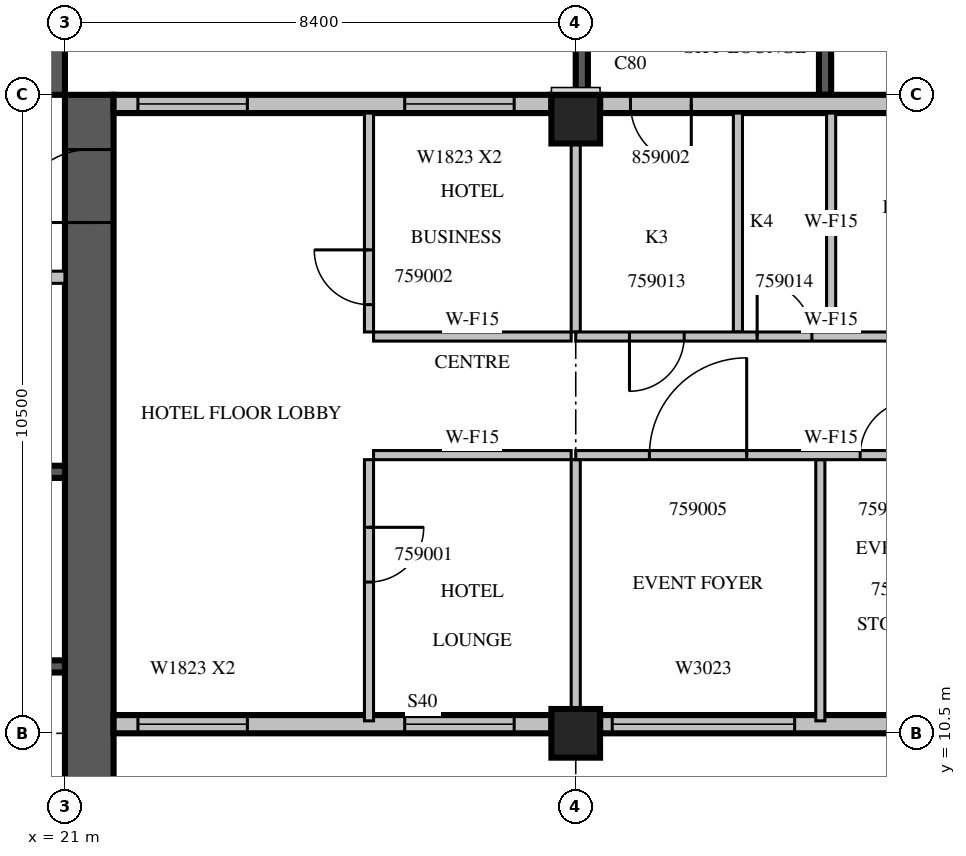
"""IFC4 building model, lengths in metres.
Left out: names, types, materials, properties, quantities, classifications, styles, units other than length and angle.
Written with IfcOpenShell. Run it as: python <this file> out.ifc"""

import sys

from ifc_helpers import new_model, si_unit, direction, frame, frame_2d, origin, origin_2d, place, context, subcontext, project, spatial, rectangle, extrude, source, transform, mapped, element, fill, save


model = new_model("IFC4")
c1 = context("Model", 3, precision=1e-05, world=origin(), true_north=direction((0.0, 1.0)))
c2 = subcontext(c1, "Body", "Model", "MODEL_VIEW")
j1 = project(units=[si_unit("LENGTHUNIT", "METRE"), si_unit("PLANEANGLEUNIT", "RADIAN")], contexts=[c1])
p1 = place(None, origin())
s1 = spatial("IfcSite", under=j1, at=p1, CompositionType="ELEMENT")
p2 = place(p1, origin())
s2 = spatial("IfcBuilding", under=s1, at=p2, CompositionType="ELEMENT")
p3 = place(p2, frame((0.0, 0.0, 257.6)))
s3 = spatial("IfcBuildingStorey", under=s2, at=p3, CompositionType="ELEMENT", Elevation=257.6)
m1 = source(origin(), c2, "Body", "SweptSolid", [
    extrude(rectangle(XDim=0.8, YDim=0.8, at=origin_2d()), origin(), (0.0, 0.0, 1.0), 3.8),
])
for number, where, z_axis, x_axis in (
    (1, (29.4, 10.5, 0.0), (0.0, 0.0, 1.0), (1.0, 0.0, 0.0)),
    (2, (29.4, 20.6, 0.0), (0.0, 0.0, 1.0), (1.0, 0.0, 0.0)),
):
    element("IfcColumn", number, at=place(p3, frame(where, z_axis=z_axis, x_axis=x_axis)), inside=s3, PredefinedType="COLUMN", context=c2, shape_type="MappedRepresentation", body=[
        mapped(m1, transform((0.0, 0.0, 0.0), scale=1.0)),
    ])
m2 = source(origin(), c2, "Body", "SweptSolid", [
    extrude(rectangle(XDim=16.8, YDim=0.8, at=frame_2d((8.4, 0.0))), origin(), (0.0, 0.0, 1.0), 3.8),
])
p4 = place(p3, frame((21.4, 4.2, 0.0), z_axis=(0.0, 0.0, 1.0), x_axis=(0.0, 1.0, 0.0)))
e3 = element("IfcWall", 3, at=p4, inside=s3, PredefinedType="SHEAR", context=c2, shape_type="MappedRepresentation", body=[
    mapped(m2, transform((0.0, 0.0, 0.0), scale=1.0)),
])
m3 = source(origin(), c2, "Body", "SweptSolid", [
    extrude(rectangle(XDim=1.2, YDim=2.1, at=frame_2d((0.6, 1.05))), frame((0.0, 0.41, 0.0), z_axis=(0.0, -1.0, 0.0), x_axis=(1.0, 0.0, 0.0)), (0.0, 0.0, 1.0), 0.82),
])
p5 = place(p4, frame((14.7, 0.0, 0.0)))
e4 = element("IfcOpeningElement", 4, at=p5, cuts=e3, PredefinedType="OPENING", context=c2, shape_type="MappedRepresentation", body=[
    mapped(m3, transform((0.0, 0.0, 0.0), scale=1.0)),
])
p6 = place(p3, frame((4.2, 21.4, 0.0), z_axis=(0.0, 0.0, 1.0), x_axis=(1.0, 0.0, 0.0)))
e5 = element("IfcWall", 5, at=p6, inside=s3, PredefinedType="SHEAR", context=c2, shape_type="MappedRepresentation", body=[
    mapped(m2, transform((0.0, 0.0, 0.0), scale=1.0)),
])
p7 = place(p6, frame((6.2, 0.0, 0.0)))
e6 = element("IfcOpeningElement", 6, at=p7, cuts=e5, PredefinedType="OPENING", context=c2, shape_type="MappedRepresentation", body=[
    mapped(m3, transform((0.0, 0.0, 0.0), scale=1.0)),
])
m4 = source(origin(), c2, "Body", "SweptSolid", [
    extrude(rectangle(XDim=3.9, YDim=0.2, at=frame_2d((1.95, 0.0))), origin(), (0.0, 0.0, 1.0), 3.4),
])
p8 = place(p3, frame((33.5, 21.0, 0.0), z_axis=(0.0, 0.0, 1.0), x_axis=(0.0, 1.0, 0.0)))
e7 = element("IfcWall", 7, at=p8, inside=s3, PredefinedType="SOLIDWALL", context=c2, shape_type="MappedRepresentation", body=[
    mapped(m4, transform((0.0, 0.0, 0.0), scale=1.0)),
])
m5 = source(origin(), c2, "Body", "SweptSolid", [
    extrude(rectangle(XDim=2.4, YDim=2.3, at=frame_2d((1.2, 1.15))), frame((0.0, 0.11, 0.0), z_axis=(0.0, -1.0, 0.0), x_axis=(1.0, 0.0, 0.0)), (0.0, 0.0, 1.0), 0.22),
])
p9 = place(p8, frame((0.75, 0.0, 0.6)))
e8 = element("IfcOpeningElement", 8, at=p9, cuts=e7, PredefinedType="OPENING", context=c2, shape_type="MappedRepresentation", body=[
    mapped(m5, transform((0.0, 0.0, 0.0), scale=1.0)),
])
p10 = place(p3, frame((29.5, 21.0, 0.0), z_axis=(0.0, 0.0, 1.0), x_axis=(0.0, 1.0, 0.0)))
e9 = element("IfcWall", 9, at=p10, inside=s3, PredefinedType="SOLIDWALL", context=c2, shape_type="MappedRepresentation", body=[
    mapped(m4, transform((0.0, 0.0, 0.0), scale=1.0)),
])
p11 = place(p10, frame((0.75, 0.0, 0.6)))
e10 = element("IfcOpeningElement", 10, at=p11, cuts=e9, PredefinedType="OPENING", context=c2, shape_type="MappedRepresentation", body=[
    mapped(m5, transform((0.0, 0.0, 0.0), scale=1.0)),
])
m6 = source(origin(), c2, "Body", "SweptSolid", [
    extrude(rectangle(XDim=7.2, YDim=0.3, at=frame_2d((3.6, 0.0))), origin(), (0.0, 0.0, 1.0), 3.4),
])
p12 = place(p3, frame((21.8, 10.65, 0.0), z_axis=(0.0, 0.0, 1.0), x_axis=(1.0, 0.0, 0.0)))
e11 = element("IfcWall", 11, at=p12, inside=s3, PredefinedType="STANDARD", context=c2, shape_type="MappedRepresentation", body=[
    mapped(m6, transform((0.0, 0.0, 0.0), scale=1.0)),
])
m7 = source(origin(), c2, "Body", "SweptSolid", [
    extrude(rectangle(XDim=1.8, YDim=2.3, at=frame_2d((0.9, 1.15))), frame((0.0, 0.16, 0.0), z_axis=(0.0, -1.0, 0.0), x_axis=(1.0, 0.0, 0.0)), (0.0, 0.0, 1.0), 0.32),
])
p13 = place(p12, frame((0.4, 0.0, 0.6)))
e12 = element("IfcOpeningElement", 12, at=p13, cuts=e11, PredefinedType="OPENING", context=c2, shape_type="MappedRepresentation", body=[
    mapped(m7, transform((0.0, 0.0, 0.0), scale=1.0)),
])
p14 = place(p12, frame((4.787, 0.0, 0.6)))
e13 = element("IfcOpeningElement", 13, at=p14, cuts=e11, PredefinedType="OPENING", context=c2, shape_type="MappedRepresentation", body=[
    mapped(m7, transform((0.0, 0.0, 0.0), scale=1.0)),
])
m8 = source(origin(), c2, "Body", "SweptSolid", [
    extrude(rectangle(XDim=7.6, YDim=0.3, at=frame_2d((3.8, 0.0))), origin(), (0.0, 0.0, 1.0), 3.4),
])
p15 = place(p3, frame((29.8, 10.65, 0.0), z_axis=(0.0, 0.0, 1.0), x_axis=(1.0, 0.0, 0.0)))
e14 = element("IfcWall", 14, at=p15, inside=s3, PredefinedType="STANDARD", context=c2, shape_type="MappedRepresentation", body=[
    mapped(m8, transform((0.0, 0.0, 0.0), scale=1.0)),
])
m9 = source(origin(), c2, "Body", "SweptSolid", [
    extrude(rectangle(XDim=3.0, YDim=2.3, at=frame_2d((1.5, 1.15))), frame((0.0, 0.16, 0.0), z_axis=(0.0, -1.0, 0.0), x_axis=(1.0, 0.0, 0.0)), (0.0, 0.0, 1.0), 0.32),
])
p16 = place(p15, frame((0.2, 0.0, 0.6)))
e15 = element("IfcOpeningElement", 15, at=p16, cuts=e14, PredefinedType="OPENING", context=c2, shape_type="MappedRepresentation", body=[
    mapped(m9, transform((0.0, 0.0, 0.0), scale=1.0)),
])
p17 = place(p3, frame((37.0, 20.85, 0.0), z_axis=(0.0, 0.0, 1.0), x_axis=(-1.0, 0.0, 0.0)))
e16 = element("IfcWall", 16, at=p17, inside=s3, PredefinedType="STANDARD", context=c2, shape_type="MappedRepresentation", body=[
    mapped(m6, transform((0.0, 0.0, 0.0), scale=1.0)),
])
p18 = place(p17, frame((0.4, 0.0, 0.6)))
e17 = element("IfcOpeningElement", 17, at=p18, cuts=e16, PredefinedType="OPENING", context=c2, shape_type="MappedRepresentation", body=[
    mapped(m7, transform((0.0, 0.0, 0.0), scale=1.0)),
])
m10 = source(origin(), c2, "Body", "SweptSolid", [
    extrude(rectangle(XDim=1.0, YDim=2.1, at=frame_2d((0.5, 1.05))), frame((0.0, 0.16, 0.0), z_axis=(0.0, -1.0, 0.0), x_axis=(1.0, 0.0, 0.0)), (0.0, 0.0, 1.0), 0.32),
])
p19 = place(p17, frame((5.7, 0.0, 0.0)))
e18 = element("IfcOpeningElement", 18, at=p19, cuts=e16, PredefinedType="OPENING", context=c2, shape_type="MappedRepresentation", body=[
    mapped(m10, transform((0.0, 0.0, 0.0), scale=1.0)),
])
p20 = place(p3, frame((29.0, 20.85, 0.0), z_axis=(0.0, 0.0, 1.0), x_axis=(-1.0, 0.0, 0.0)))
e19 = element("IfcWall", 19, at=p20, inside=s3, PredefinedType="STANDARD", context=c2, shape_type="MappedRepresentation", body=[
    mapped(m6, transform((0.0, 0.0, 0.0), scale=1.0)),
])
p21 = place(p20, frame((0.613, 0.0, 0.6)))
e20 = element("IfcOpeningElement", 20, at=p21, cuts=e19, PredefinedType="OPENING", context=c2, shape_type="MappedRepresentation", body=[
    mapped(m7, transform((0.0, 0.0, 0.0), scale=1.0)),
])
p22 = place(p20, frame((5.0, 0.0, 0.6)))
e21 = element("IfcOpeningElement", 21, at=p22, cuts=e19, PredefinedType="OPENING", context=c2, shape_type="MappedRepresentation", body=[
    mapped(m7, transform((0.0, 0.0, 0.0), scale=1.0)),
])
m11 = source(origin(), c2, "Body", "SweptSolid", [
    extrude(rectangle(XDim=9.6, YDim=0.2, at=frame_2d((4.8, 0.0))), origin(), (0.0, 0.0, 1.0), 3.8),
])
p23 = place(p3, frame((11.4, 11.6, 0.0), z_axis=(0.0, 0.0, 1.0), x_axis=(1.0, 0.0, 0.0)))
e22 = element("IfcWall", 22, at=p23, inside=s3, PredefinedType="SOLIDWALL", context=c2, shape_type="MappedRepresentation", body=[
    mapped(m11, transform((0.0, 0.0, 0.0), scale=1.0)),
])
p24 = place(p3, frame((11.4, 14.8, 0.0), z_axis=(0.0, 0.0, 1.0), x_axis=(1.0, 0.0, 0.0)))
e23 = element("IfcWall", 23, at=p24, inside=s3, PredefinedType="SOLIDWALL", context=c2, shape_type="MappedRepresentation", body=[
    mapped(m11, transform((0.0, 0.0, 0.0), scale=1.0)),
])
m12 = source(origin(), c2, "Body", "SweptSolid", [
    extrude(rectangle(XDim=1.1, YDim=2.1, at=frame_2d((0.55, 1.05))), frame((0.0, 0.11, 0.0), z_axis=(0.0, -1.0, 0.0), x_axis=(1.0, 0.0, 0.0)), (0.0, 0.0, 1.0), 0.22),
])
p25 = place(p24, frame((3.05, 0.0, 0.0)))
e24 = element("IfcOpeningElement", 24, at=p25, cuts=e23, PredefinedType="OPENING", context=c2, shape_type="MappedRepresentation", body=[
    mapped(m12, transform((0.0, 0.0, 0.0), scale=1.0)),
])
p26 = place(p24, frame((5.45, 0.0, 0.0)))
e25 = element("IfcOpeningElement", 25, at=p26, cuts=e23, PredefinedType="OPENING", context=c2, shape_type="MappedRepresentation", body=[
    mapped(m12, transform((0.0, 0.0, 0.0), scale=1.0)),
])
p27 = place(p24, frame((7.85, 0.0, 0.0)))
e26 = element("IfcOpeningElement", 26, at=p27, cuts=e23, PredefinedType="OPENING", context=c2, shape_type="MappedRepresentation", body=[
    mapped(m12, transform((0.0, 0.0, 0.0), scale=1.0)),
])
m13 = source(origin(), c2, "Body", "SweptSolid", [
    extrude(rectangle(XDim=11.45, YDim=0.2, at=frame_2d((5.725, 0.0))), origin(), (0.0, 0.0, 1.0), 3.4),
])
p28 = place(p3, frame((9.55, 18.0, 0.0), z_axis=(0.0, 0.0, 1.0), x_axis=(1.0, 0.0, 0.0)))
e27 = element("IfcWall", 27, at=p28, inside=s3, PredefinedType="PARTITIONING", context=c2, shape_type="MappedRepresentation", body=[
    mapped(m13, transform((0.0, 0.0, 0.0), scale=1.0)),
])
m14 = source(origin(), c2, "Body", "SweptSolid", [
    extrude(rectangle(XDim=0.9, YDim=2.1, at=frame_2d((0.45, 1.05))), frame((0.0, 0.11, 0.0), z_axis=(0.0, -1.0, 0.0), x_axis=(1.0, 0.0, 0.0)), (0.0, 0.0, 1.0), 0.22),
])
p29 = place(p28, frame((0.725, 0.0, 0.0)))
e28 = element("IfcOpeningElement", 28, at=p29, cuts=e27, PredefinedType="OPENING", context=c2, shape_type="MappedRepresentation", body=[
    mapped(m14, transform((0.0, 0.0, 0.0), scale=1.0)),
])
p30 = place(p28, frame((2.775, 0.0, 0.0)))
e29 = element("IfcOpeningElement", 29, at=p30, cuts=e27, PredefinedType="OPENING", context=c2, shape_type="MappedRepresentation", body=[
    mapped(m14, transform((0.0, 0.0, 0.0), scale=1.0)),
])
p31 = place(p28, frame((7.35, 0.0, 0.0)))
e30 = element("IfcOpeningElement", 30, at=p31, cuts=e27, PredefinedType="OPENING", context=c2, shape_type="MappedRepresentation", body=[
    mapped(m12, transform((0.0, 0.0, 0.0), scale=1.0)),
])
m15 = source(origin(), c2, "Body", "SweptSolid", [
    extrude(rectangle(XDim=4.295, YDim=0.15, at=frame_2d((2.147, 0.0))), origin(), (0.0, 0.0, 1.0), 3.4),
])
p32 = place(p3, frame((26.0, 15.0, 0.0), z_axis=(0.0, 0.0, 1.0), x_axis=(0.0, -1.0, 0.0)))
e31 = element("IfcWall", 31, at=p32, inside=s3, PredefinedType="PARTITIONING", context=c2, shape_type="MappedRepresentation", body=[
    mapped(m15, transform((0.0, 0.0, 0.0), scale=1.0)),
])
m16 = source(origin(), c2, "Body", "SweptSolid", [
    extrude(rectangle(XDim=0.9, YDim=2.1, at=frame_2d((0.45, 1.05))), frame((0.0, 0.085, 0.0), z_axis=(0.0, -1.0, 0.0), x_axis=(1.0, 0.0, 0.0)), (0.0, 0.0, 1.0), 0.17),
])
p33 = place(p32, frame((1.113, 0.0, 0.0)))
e32 = element("IfcOpeningElement", 32, at=p33, cuts=e31, PredefinedType="OPENING", context=c2, shape_type="MappedRepresentation", body=[
    mapped(m16, transform((0.0, 0.0, 0.0), scale=1.0)),
])
m17 = source(origin(), c2, "Body", "SweptSolid", [
    extrude(rectangle(XDim=3.6, YDim=0.15, at=frame_2d((1.8, 0.0))), origin(), (0.0, 0.0, 1.0), 3.4),
])
p34 = place(p3, frame((26.0, 20.7, 0.0), z_axis=(0.0, 0.0, 1.0), x_axis=(0.0, -1.0, 0.0)))
e33 = element("IfcWall", 33, at=p34, inside=s3, PredefinedType="PARTITIONING", context=c2, shape_type="MappedRepresentation", body=[
    mapped(m17, transform((0.0, 0.0, 0.0), scale=1.0)),
])
p35 = place(p34, frame((2.25, 0.0, 0.0)))
e34 = element("IfcOpeningElement", 34, at=p35, cuts=e33, PredefinedType="OPENING", context=c2, shape_type="MappedRepresentation", body=[
    mapped(m16, transform((0.0, 0.0, 0.0), scale=1.0)),
])
m18 = source(origin(), c2, "Body", "SweptSolid", [
    extrude(rectangle(XDim=3.25, YDim=0.15, at=frame_2d((1.625, 0.0))), origin(), (0.0, 0.0, 1.0), 3.4),
])
for number, where, z_axis, x_axis in (
    (35, (29.325, 15.075, 0.0), (0.0, 0.0, 1.0), (-1.0, 0.0, 0.0)),
    (36, (26.075, 17.025, 0.0), (0.0, 0.0, 1.0), (1.0, 0.0, 0.0)),
):
    element("IfcWall", number, at=place(p3, frame(where, z_axis=z_axis, x_axis=x_axis)), inside=s3, PredefinedType="PARTITIONING", context=c2, shape_type="MappedRepresentation", body=[
        mapped(m18, transform((0.0, 0.0, 0.0), scale=1.0)),
    ])
m19 = source(origin(), c2, "Body", "SweptSolid", [
    extrude(rectangle(XDim=4.101, YDim=0.15, at=frame_2d((2.05, 0.0))), origin(), (0.0, 0.0, 1.0), 3.4),
])
p36 = place(p3, frame((29.4, 10.899, 0.0), z_axis=(0.0, 0.0, 1.0), x_axis=(0.0, 1.0, 0.0)))
e37 = element("IfcWall", 37, at=p36, inside=s3, PredefinedType="PARTITIONING", context=c2, shape_type="MappedRepresentation", body=[
    mapped(m19, transform((0.0, 0.0, 0.0), scale=1.0)),
])
m20 = source(origin(), c2, "Body", "SweptSolid", [
    extrude(rectangle(XDim=3.101, YDim=0.15, at=frame_2d((1.55, 0.0))), origin(), (0.0, 0.0, 1.0), 3.4),
])
p37 = place(p3, frame((29.4, 17.1, 0.0), z_axis=(0.0, 0.0, 1.0), x_axis=(0.0, 1.0, 0.0)))
e38 = element("IfcWall", 38, at=p37, inside=s3, PredefinedType="PARTITIONING", context=c2, shape_type="MappedRepresentation", body=[
    mapped(m20, transform((0.0, 0.0, 0.0), scale=1.0)),
])
p38 = place(p3, frame((33.422, 10.705, 0.0), z_axis=(0.0, 0.0, 1.0), x_axis=(0.0, 1.0, 0.0)))
e39 = element("IfcWall", 39, at=p38, inside=s3, PredefinedType="PARTITIONING", context=c2, shape_type="MappedRepresentation", body=[
    mapped(m15, transform((0.0, 0.0, 0.0), scale=1.0)),
])
for number, where, z_axis, x_axis in (
    (40, (32.067, 20.7, 0.0), (0.0, 0.0, 1.0), (0.0, -1.0, 0.0)),
    (41, (33.6, 17.1, 0.0), (0.0, 0.0, 1.0), (0.0, 1.0, 0.0)),
):
    element("IfcWall", number, at=place(p3, frame(where, z_axis=z_axis, x_axis=x_axis)), inside=s3, PredefinedType="PARTITIONING", context=c2, shape_type="MappedRepresentation", body=[
        mapped(m17, transform((0.0, 0.0, 0.0), scale=1.0)),
    ])
m21 = source(origin(), c2, "Body", "SweptSolid", [
    extrude(rectangle(XDim=8.4, YDim=0.15, at=frame_2d((4.2, 0.0))), origin(), (0.0, 0.0, 1.0), 3.4),
])
p39 = place(p3, frame((37.8, 15.075, 0.0), z_axis=(0.0, 0.0, 1.0), x_axis=(-1.0, 0.0, 0.0)))
e42 = element("IfcWall", 42, at=p39, inside=s3, PredefinedType="PARTITIONING", context=c2, shape_type="MappedRepresentation", body=[
    mapped(m21, transform((0.0, 0.0, 0.0), scale=1.0)),
])
m22 = source(origin(), c2, "Body", "SweptSolid", [
    extrude(rectangle(XDim=1.6, YDim=2.1, at=frame_2d((0.8, 1.05))), frame((0.0, 0.085, 0.0), z_axis=(0.0, -1.0, 0.0), x_axis=(1.0, 0.0, 0.0)), (0.0, 0.0, 1.0), 0.17),
])
p40 = place(p39, frame((5.589, 0.0, 0.0)))
e43 = element("IfcOpeningElement", 43, at=p40, cuts=e42, PredefinedType="OPENING", context=c2, shape_type="MappedRepresentation", body=[
    mapped(m22, transform((0.0, 0.0, 0.0), scale=1.0)),
])
p41 = place(p39, frame((2.822, 0.0, 0.0)))
e44 = element("IfcOpeningElement", 44, at=p41, cuts=e42, PredefinedType="OPENING", context=c2, shape_type="MappedRepresentation", body=[
    mapped(m16, transform((0.0, 0.0, 0.0), scale=1.0)),
])
p42 = place(p3, frame((29.4, 17.025, 0.0), z_axis=(0.0, 0.0, 1.0), x_axis=(1.0, 0.0, 0.0)))
e45 = element("IfcWall", 45, at=p42, inside=s3, PredefinedType="PARTITIONING", context=c2, shape_type="MappedRepresentation", body=[
    mapped(m21, transform((0.0, 0.0, 0.0), scale=1.0)),
])
p43 = place(p42, frame((0.883, 0.0, 0.0)))
e46 = element("IfcOpeningElement", 46, at=p43, cuts=e45, PredefinedType="OPENING", context=c2, shape_type="MappedRepresentation", body=[
    mapped(m16, transform((0.0, 0.0, 0.0), scale=1.0)),
])
p44 = place(p42, frame((2.983, 0.0, 0.0)))
e47 = element("IfcOpeningElement", 47, at=p44, cuts=e45, PredefinedType="OPENING", context=c2, shape_type="MappedRepresentation", body=[
    mapped(m16, transform((0.0, 0.0, 0.0), scale=1.0)),
])
p45 = place(p42, frame((5.737, 0.0, 0.0)))
e48 = element("IfcOpeningElement", 48, at=p45, cuts=e45, PredefinedType="OPENING", context=c2, shape_type="MappedRepresentation", body=[
    mapped(m16, transform((0.0, 0.0, 0.0), scale=1.0)),
])
m23 = source(origin(), c2, "Body", "SweptSolid", [
    extrude(rectangle(XDim=1.8, YDim=2.3, at=frame_2d((0.9, 1.15))), frame((0.0, 0.03, 0.0), z_axis=(0.0, -1.0, 0.0), x_axis=(1.0, 0.0, 0.0)), (0.0, 0.0, 1.0), 0.06),
])
p46 = place(p13, origin())
e49 = element("IfcWindow", 49, at=p46, inside=s3, PartitioningType="SINGLE_PANEL", PredefinedType="WINDOW", context=c2, shape_type="MappedRepresentation", body=[
    mapped(m23, transform((0.0, 0.0, 0.0), scale=1.0)),
])
fill(e12, e49)
p47 = place(p14, origin())
e50 = element("IfcWindow", 50, at=p47, inside=s3, PartitioningType="SINGLE_PANEL", PredefinedType="WINDOW", context=c2, shape_type="MappedRepresentation", body=[
    mapped(m23, transform((0.0, 0.0, 0.0), scale=1.0)),
])
fill(e13, e50)
m24 = source(origin(), c2, "Body", "SweptSolid", [
    extrude(rectangle(XDim=3.0, YDim=2.3, at=frame_2d((1.5, 1.15))), frame((0.0, 0.03, 0.0), z_axis=(0.0, -1.0, 0.0), x_axis=(1.0, 0.0, 0.0)), (0.0, 0.0, 1.0), 0.06),
])
p48 = place(p16, origin())
e51 = element("IfcWindow", 51, at=p48, inside=s3, PartitioningType="SINGLE_PANEL", PredefinedType="WINDOW", context=c2, shape_type="MappedRepresentation", body=[
    mapped(m24, transform((0.0, 0.0, 0.0), scale=1.0)),
])
fill(e15, e51)
p49 = place(p21, origin())
e52 = element("IfcWindow", 52, at=p49, inside=s3, PartitioningType="SINGLE_PANEL", PredefinedType="WINDOW", context=c2, shape_type="MappedRepresentation", body=[
    mapped(m23, transform((0.0, 0.0, 0.0), scale=1.0)),
])
fill(e20, e52)
p50 = place(p22, origin())
e53 = element("IfcWindow", 53, at=p50, inside=s3, PartitioningType="SINGLE_PANEL", PredefinedType="WINDOW", context=c2, shape_type="MappedRepresentation", body=[
    mapped(m23, transform((0.0, 0.0, 0.0), scale=1.0)),
])
fill(e21, e53)
m25 = source(origin(), c2, "Body", "SweptSolid", [
    extrude(rectangle(XDim=1.2, YDim=2.1, at=frame_2d((0.6, 1.05))), frame((0.0, 0.025, 0.0), z_axis=(0.0, -1.0, 0.0), x_axis=(1.0, 0.0, 0.0)), (0.0, 0.0, 1.0), 0.05),
])
p51 = place(p5, origin())
e54 = element("IfcDoor", 54, at=p51, inside=s3, OperationType="SINGLE_SWING_LEFT", PredefinedType="DOOR", context=c2, shape_type="MappedRepresentation", body=[
    mapped(m25, transform((0.0, 0.0, 0.0), scale=1.0)),
])
fill(e4, e54)
m26 = source(origin(), c2, "Body", "SweptSolid", [
    extrude(rectangle(XDim=0.9, YDim=2.1, at=frame_2d((0.45, 1.05))), frame((0.0, 0.025, 0.0), z_axis=(0.0, -1.0, 0.0), x_axis=(1.0, 0.0, 0.0)), (0.0, 0.0, 1.0), 0.05),
])
p52 = place(p33, origin())
e55 = element("IfcDoor", 55, at=p52, inside=s3, OperationType="SINGLE_SWING_LEFT", PredefinedType="DOOR", context=c2, shape_type="MappedRepresentation", body=[
    mapped(m26, transform((0.0, 0.0, 0.0), scale=1.0)),
])
fill(e32, e55)
p53 = place(p35, origin())
e56 = element("IfcDoor", 56, at=p53, inside=s3, OperationType="SINGLE_SWING_RIGHT", PredefinedType="DOOR", context=c2, shape_type="MappedRepresentation", body=[
    mapped(m26, transform((0.0, 0.0, 0.0), scale=1.0)),
])
fill(e34, e56)
m27 = source(origin(), c2, "Body", "SweptSolid", [
    extrude(rectangle(XDim=1.6, YDim=2.1, at=frame_2d((0.8, 1.05))), frame((0.0, 0.025, 0.0), z_axis=(0.0, -1.0, 0.0), x_axis=(1.0, 0.0, 0.0)), (0.0, 0.0, 1.0), 0.05),
])
p54 = place(p40, origin())
e57 = element("IfcDoor", 57, at=p54, inside=s3, OperationType="SINGLE_SWING_RIGHT", PredefinedType="DOOR", context=c2, shape_type="MappedRepresentation", body=[
    mapped(m27, transform((0.0, 0.0, 0.0), scale=1.0)),
])
fill(e43, e57)
p55 = place(p41, origin())
e58 = element("IfcDoor", 58, at=p55, inside=s3, OperationType="SINGLE_SWING_RIGHT", PredefinedType="DOOR", context=c2, shape_type="MappedRepresentation", body=[
    mapped(m26, transform((0.0, 0.0, 0.0), scale=1.0)),
])
fill(e44, e58)
p56 = place(p43, origin())
e59 = element("IfcDoor", 59, at=p56, inside=s3, OperationType="SINGLE_SWING_RIGHT", PredefinedType="DOOR", context=c2, shape_type="MappedRepresentation", body=[
    mapped(m26, transform((0.0, 0.0, 0.0), scale=1.0)),
])
fill(e46, e59)
p57 = place(p44, origin())
e60 = element("IfcDoor", 60, at=p57, inside=s3, OperationType="SINGLE_SWING_LEFT", PredefinedType="DOOR", context=c2, shape_type="MappedRepresentation", body=[
    mapped(m26, transform((0.0, 0.0, 0.0), scale=1.0)),
])
fill(e47, e60)
m28 = source(origin(), c2, "Body", "SweptSolid", [
    extrude(rectangle(XDim=1.0, YDim=2.1, at=frame_2d((0.5, 1.05))), frame((0.0, 0.025, 0.0), z_axis=(0.0, -1.0, 0.0), x_axis=(1.0, 0.0, 0.0)), (0.0, 0.0, 1.0), 0.05),
])
p58 = place(p19, origin())
e61 = element("IfcDoor", 61, at=p58, inside=s3, OperationType="SINGLE_SWING_LEFT", PredefinedType="DOOR", context=c2, shape_type="MappedRepresentation", body=[
    mapped(m28, transform((0.0, 0.0, 0.0), scale=1.0)),
])
fill(e18, e61)
save(model, sys.argv[1])
